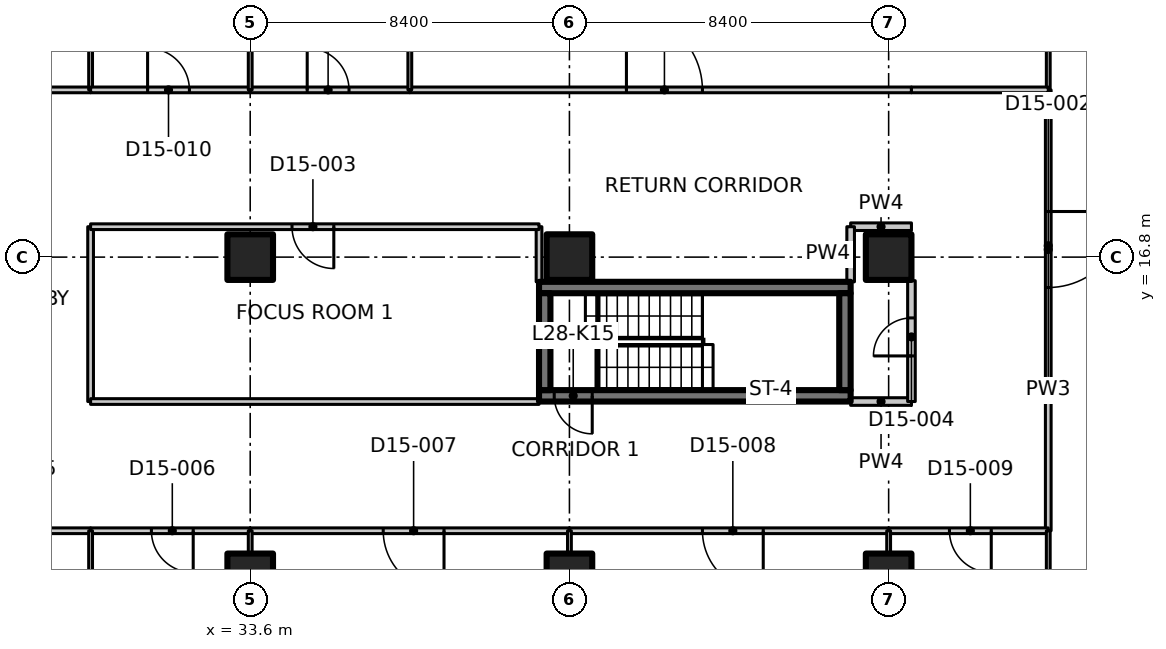
"""IFC4 building model, lengths in metres.
Left out: names, types, materials, properties, quantities, classifications, styles, units other than length and angle.
Written with IfcOpenShell. Run it as: python <this file> out.ifc"""

import sys

from ifc_helpers import new_model, si_unit, direction, frame, frame_2d, origin, origin_2d, place, context, subcontext, project, spatial, polyline, rectangle, outline, extrude, element, fill, save


model = new_model("IFC4")
c1 = context("Model", 3, precision=1e-05, world=origin(), true_north=direction((0.0, 1.0)))
c2 = subcontext(c1, "Body", "Model", "MODEL_VIEW")
j1 = project(units=[si_unit("LENGTHUNIT", "METRE"), si_unit("PLANEANGLEUNIT", "RADIAN")], contexts=[c1])
p1 = place(None, origin())
s1 = spatial("IfcSite", under=j1, at=p1, CompositionType="ELEMENT")
p2 = place(p1, origin())
s2 = spatial("IfcBuilding", under=s1, at=p2, CompositionType="ELEMENT")
p3 = place(p2, frame((0.0, 0.0, 116.9)))
s3 = spatial("IfcBuildingStorey", under=s2, at=p3, CompositionType="ELEMENT", Elevation=116.9)
for number, where, z_axis, x_axis in (
    (1, (33.6, 8.4, 0.0), (0.0, 0.0, 1.0), (1.0, 0.0, 0.0)),
    (2, (33.6, 16.8, 0.0), (0.0, 0.0, 1.0), (1.0, 0.0, 0.0)),
    (3, (42.0, 8.4, 0.0), (0.0, 0.0, 1.0), (1.0, 0.0, 0.0)),
    (4, (42.0, 16.8, 0.0), (0.0, 0.0, 1.0), (1.0, 0.0, 0.0)),
    (5, (50.4, 8.4, 0.0), (0.0, 0.0, 1.0), (1.0, 0.0, 0.0)),
    (6, (50.4, 16.8, 0.0), (0.0, 0.0, 1.0), (1.0, 0.0, 0.0)),
):
    element("IfcColumn", number, at=place(p3, frame(where, z_axis=z_axis, x_axis=x_axis)), inside=s3, PredefinedType="COLUMN", context=c2, shape_type="SweptSolid", body=[
        extrude(rectangle(XDim=1.2, YDim=1.2, at=origin_2d()), origin(), (0.0, 0.0, 1.0), 3.35),
    ])
p4 = place(p3, frame((49.4, 13.15, 0.0), z_axis=(0.0, 0.0, 1.0), x_axis=(-1.0, 0.0, 0.0)))
e7 = element("IfcWall", 7, at=p4, inside=s3, PredefinedType="SHEAR", context=c2, shape_type="SweptSolid", body=[
    extrude(rectangle(XDim=8.2, YDim=0.3, at=frame_2d((4.1, 0.0))), origin(), (0.0, 0.0, 1.0), 3.35),
])
p5 = place(p4, frame((6.8, 0.0, 0.0)))
e8 = element("IfcOpeningElement", 8, at=p5, cuts=e7, PredefinedType="OPENING", context=c2, shape_type="SweptSolid", body=[
    extrude(rectangle(XDim=1.0, YDim=2.1, at=frame_2d((0.5, 1.05))), frame((0.0, 0.16, 0.0), z_axis=(0.0, -1.0, 0.0), x_axis=(1.0, 0.0, 0.0)), (0.0, 0.0, 1.0), 0.32),
])
p6 = place(p3, frame((41.2, 16.0, 0.0), z_axis=(0.0, 0.0, 1.0), x_axis=(1.0, 0.0, 0.0)))
e9 = element("IfcWall", 9, at=p6, inside=s3, PredefinedType="SHEAR", context=c2, shape_type="SweptSolid", body=[
    extrude(rectangle(XDim=8.2, YDim=0.3, at=frame_2d((4.1, 0.0))), origin(), (0.0, 0.0, 1.0), 3.35),
])
for number, where, z_axis, x_axis in (
    (10, (41.35, 13.3, 0.0), (0.0, 0.0, 1.0), (0.0, 1.0, 0.0)),
    (11, (49.25, 13.3, 0.0), (0.0, 0.0, 1.0), (0.0, 1.0, 0.0)),
):
    element("IfcWall", number, at=place(p3, frame(where, z_axis=z_axis, x_axis=x_axis)), inside=s3, PredefinedType="SHEAR", context=c2, shape_type="SweptSolid", body=[
        extrude(rectangle(XDim=2.55, YDim=0.3, at=frame_2d((1.275, 0.0))), origin(), (0.0, 0.0, 1.0), 3.35),
    ])
p7 = place(p3, frame((25.2, 21.2, 0.0), z_axis=(0.0, 0.0, 1.0), x_axis=(1.0, 0.0, 0.0)))
e12 = element("IfcWall", 12, at=p7, inside=s3, PredefinedType="PARTITIONING", context=c2, shape_type="SweptSolid", body=[
    extrude(rectangle(XDim=4.2, YDim=0.15, at=frame_2d((2.1, 0.0))), origin(), (0.0, 0.0, 1.0), 3.33),
])
p8 = place(p3, frame((29.4, 17.6, 0.0), z_axis=(0.0, 0.0, 1.0), x_axis=(0.0, -1.0, 0.0)))
e13 = element("IfcWall", 13, at=p8, inside=s3, PredefinedType="PARTITIONING", context=c2, shape_type="SweptSolid", body=[
    extrude(rectangle(XDim=4.6, YDim=0.15, at=frame_2d((2.3, 0.0))), origin(), (0.0, 0.0, 1.0), 3.33),
])
p9 = place(p3, frame((29.4, 9.6, 0.0), z_axis=(0.0, 0.0, 1.0), x_axis=(-1.0, 0.0, 0.0)))
e14 = element("IfcWall", 14, at=p9, inside=s3, PredefinedType="PARTITIONING", context=c2, shape_type="SweptSolid", body=[
    extrude(rectangle(XDim=4.2, YDim=0.15, at=frame_2d((2.1, 0.0))), origin(), (0.0, 0.0, 1.0), 3.33),
])
p10 = place(p9, frame((1.5, 0.0, 0.0)))
e15 = element("IfcOpeningElement", 15, at=p10, cuts=e14, PredefinedType="OPENING", context=c2, shape_type="SweptSolid", body=[
    extrude(rectangle(XDim=1.1, YDim=2.1, at=frame_2d((0.55, 1.05))), frame((0.0, 0.085, 0.0), z_axis=(0.0, -1.0, 0.0), x_axis=(1.0, 0.0, 0.0)), (0.0, 0.0, 1.0), 0.17),
])
p11 = place(p3, frame((29.4, 27.429, 0.0), z_axis=(0.0, 0.0, 1.0), x_axis=(0.0, -1.0, 0.0)))
e16 = element("IfcWall", 16, at=p11, inside=s3, PredefinedType="PARTITIONING", context=c2, shape_type="SweptSolid", body=[
    extrude(outline(polyline([(0.0, 0.0), (6.229, 0.0), (6.229, 3.33), (2.679, 3.33), (2.677, 2.98), (1.781, 2.98), (1.779, 3.33), (0.154, 3.33), (0.0, 3.33), (0.0, 0.0)])), frame((0.0, 0.05, 0.0), z_axis=(0.0, -1.0, 0.0), x_axis=(1.0, 0.0, 0.0)), (0.0, 0.0, 1.0), 0.1),
])
p12 = place(p3, frame((54.6, 13.0, 0.0), z_axis=(0.0, 0.0, 1.0), x_axis=(0.0, -1.0, 0.0)))
e17 = element("IfcWall", 17, at=p12, inside=s3, PredefinedType="PARTITIONING", context=c2, shape_type="SweptSolid", body=[
    extrude(rectangle(XDim=3.4, YDim=0.15, at=frame_2d((1.7, 0.0))), origin(), (0.0, 0.0, 1.0), 3.33),
])
p13 = place(p3, frame((29.4, 13.0, 0.0), z_axis=(0.0, 0.0, 1.0), x_axis=(1.0, 0.0, 0.0)))
e18 = element("IfcWall", 18, at=p13, inside=s3, PredefinedType="PARTITIONING", context=c2, shape_type="SweptSolid", body=[
    extrude(rectangle(XDim=11.8, YDim=0.15, at=frame_2d((5.9, 0.0))), origin(), (0.0, 0.0, 1.0), 3.33),
])
p14 = place(p3, frame((49.4, 13.0, 0.0), z_axis=(0.0, 0.0, 1.0), x_axis=(1.0, 0.0, 0.0)))
e19 = element("IfcWall", 19, at=p14, inside=s3, PredefinedType="PARTITIONING", context=c2, shape_type="SweptSolid", body=[
    extrude(rectangle(XDim=1.6, YDim=0.2, at=frame_2d((0.8, 0.0))), origin(), (0.0, 0.0, 1.0), 3.33),
])
p15 = place(p3, frame((33.6, 9.6, 0.0), z_axis=(0.0, 0.0, 1.0), x_axis=(-1.0, 0.0, 0.0)))
e20 = element("IfcWall", 20, at=p15, inside=s3, PredefinedType="PARTITIONING", context=c2, shape_type="SweptSolid", body=[
    extrude(rectangle(XDim=4.2, YDim=0.15, at=frame_2d((2.1, 0.0))), origin(), (0.0, 0.0, 1.0), 3.33),
])
p16 = place(p15, frame((1.5, 0.0, 0.0)))
e21 = element("IfcOpeningElement", 21, at=p16, cuts=e20, PredefinedType="OPENING", context=c2, shape_type="SweptSolid", body=[
    extrude(rectangle(XDim=1.1, YDim=2.1, at=frame_2d((0.55, 1.05))), frame((0.0, 0.085, 0.0), z_axis=(0.0, -1.0, 0.0), x_axis=(1.0, 0.0, 0.0)), (0.0, 0.0, 1.0), 0.17),
])
p17 = place(p3, frame((42.0, 9.6, 0.0), z_axis=(0.0, 0.0, 1.0), x_axis=(-1.0, 0.0, 0.0)))
e22 = element("IfcWall", 22, at=p17, inside=s3, PredefinedType="PARTITIONING", context=c2, shape_type="SweptSolid", body=[
    extrude(rectangle(XDim=8.4, YDim=0.15, at=frame_2d((4.2, 0.0))), origin(), (0.0, 0.0, 1.0), 3.33),
])
p18 = place(p17, frame((3.3, 0.0, 0.0)))
e23 = element("IfcOpeningElement", 23, at=p18, cuts=e22, PredefinedType="OPENING", context=c2, shape_type="SweptSolid", body=[
    extrude(rectangle(XDim=1.6, YDim=2.1, at=frame_2d((0.8, 1.05))), frame((0.0, 0.085, 0.0), z_axis=(0.0, -1.0, 0.0), x_axis=(1.0, 0.0, 0.0)), (0.0, 0.0, 1.0), 0.17),
])
p19 = place(p3, frame((50.4, 9.6, 0.0), z_axis=(0.0, 0.0, 1.0), x_axis=(-1.0, 0.0, 0.0)))
e24 = element("IfcWall", 24, at=p19, inside=s3, PredefinedType="PARTITIONING", context=c2, shape_type="SweptSolid", body=[
    extrude(rectangle(XDim=8.4, YDim=0.15, at=frame_2d((4.2, 0.0))), origin(), (0.0, 0.0, 1.0), 3.33),
])
p20 = place(p19, frame((3.3, 0.0, 0.0)))
e25 = element("IfcOpeningElement", 25, at=p20, cuts=e24, PredefinedType="OPENING", context=c2, shape_type="SweptSolid", body=[
    extrude(rectangle(XDim=1.6, YDim=2.1, at=frame_2d((0.8, 1.05))), frame((0.0, 0.085, 0.0), z_axis=(0.0, -1.0, 0.0), x_axis=(1.0, 0.0, 0.0)), (0.0, 0.0, 1.0), 0.17),
])
p21 = place(p3, frame((54.6, 9.6, 0.0), z_axis=(0.0, 0.0, 1.0), x_axis=(-1.0, 0.0, 0.0)))
e26 = element("IfcWall", 26, at=p21, inside=s3, PredefinedType="PARTITIONING", context=c2, shape_type="SweptSolid", body=[
    extrude(rectangle(XDim=4.2, YDim=0.15, at=frame_2d((2.1, 0.0))), origin(), (0.0, 0.0, 1.0), 3.33),
])
p22 = place(p21, frame((1.5, 0.0, 0.0)))
e27 = element("IfcOpeningElement", 27, at=p22, cuts=e26, PredefinedType="OPENING", context=c2, shape_type="SweptSolid", body=[
    extrude(rectangle(XDim=1.1, YDim=2.1, at=frame_2d((0.55, 1.05))), frame((0.0, 0.085, 0.0), z_axis=(0.0, -1.0, 0.0), x_axis=(1.0, 0.0, 0.0)), (0.0, 0.0, 1.0), 0.17),
])
p23 = place(p3, frame((54.6, 21.2, 0.0), z_axis=(0.0, 0.0, 1.0), x_axis=(0.0, -1.0, 0.0)))
e28 = element("IfcWall", 28, at=p23, inside=s3, PredefinedType="PARTITIONING", context=c2, shape_type="SweptSolid", body=[
    extrude(rectangle(XDim=8.2, YDim=0.15, at=frame_2d((4.1, 0.0))), origin(), (0.0, 0.0, 1.0), 3.33),
])
p24 = place(p23, frame((3.2, 0.0, 0.0)))
e29 = element("IfcOpeningElement", 29, at=p24, cuts=e28, PredefinedType="OPENING", context=c2, shape_type="SweptSolid", body=[
    extrude(rectangle(XDim=2.0, YDim=2.4, at=frame_2d((1.0, 1.2))), frame((0.0, 0.085, 0.0), z_axis=(0.0, -1.0, 0.0), x_axis=(1.0, 0.0, 0.0)), (0.0, 0.0, 1.0), 0.17),
])
p25 = place(p3, frame((54.6, -1.365, 0.0), z_axis=(0.0, 0.0, 1.0), x_axis=(0.0, 1.0, 0.0)))
e30 = element("IfcWall", 30, at=p25, inside=s3, PredefinedType="PARTITIONING", context=c2, shape_type="SweptSolid", body=[
    extrude(outline(polyline([(0.0, 0.0), (10.965, 0.0), (10.965, 3.33), (1.815, 3.33), (1.813, 2.98), (0.917, 2.98), (0.915, 3.33), (0.265, 3.33), (0.0, 3.33), (0.0, 0.0)])), frame((0.0, 0.05, 0.0), z_axis=(0.0, -1.0, 0.0), x_axis=(1.0, 0.0, 0.0)), (0.0, 0.0, 1.0), 0.1),
])
p26 = place(p3, frame((54.6, 21.2, 0.0), z_axis=(0.0, 0.0, 1.0), x_axis=(0.0, 1.0, 0.0)))
e31 = element("IfcWall", 31, at=p26, inside=s3, PredefinedType="PARTITIONING", context=c2, shape_type="SweptSolid", body=[
    extrude(outline(polyline([(0.0, 0.0), (5.174, 0.0), (5.174, 3.33), (5.1, 3.33), (4.45, 3.33), (4.448, 2.98), (3.552, 2.98), (3.55, 3.33), (0.0, 3.33), (0.0, 0.0)])), frame((0.0, 0.05, 0.0), z_axis=(0.0, -1.0, 0.0), x_axis=(1.0, 0.0, 0.0)), (0.0, 0.0, 1.0), 0.1),
])
p27 = place(p3, frame((41.2, 16.15, 0.0), z_axis=(0.0, 0.0, 1.0), x_axis=(0.0, 1.0, 0.0)))
e32 = element("IfcWall", 32, at=p27, inside=s3, PredefinedType="PARTITIONING", context=c2, shape_type="SweptSolid", body=[
    extrude(rectangle(XDim=1.45, YDim=0.15, at=frame_2d((0.725, 0.0))), origin(), (0.0, 0.0, 1.0), 3.33),
])
p28 = place(p3, frame((41.2, 17.6, 0.0), z_axis=(0.0, 0.0, 1.0), x_axis=(-1.0, 0.0, 0.0)))
e33 = element("IfcWall", 33, at=p28, inside=s3, PredefinedType="PARTITIONING", context=c2, shape_type="SweptSolid", body=[
    extrude(rectangle(XDim=11.8, YDim=0.15, at=frame_2d((5.9, 0.0))), origin(), (0.0, 0.0, 1.0), 3.33),
])
p29 = place(p28, frame((5.4, 0.0, 0.0)))
e34 = element("IfcOpeningElement", 34, at=p29, cuts=e33, PredefinedType="OPENING", context=c2, shape_type="SweptSolid", body=[
    extrude(rectangle(XDim=1.1, YDim=2.1, at=frame_2d((0.55, 1.05))), frame((0.0, 0.085, 0.0), z_axis=(0.0, -1.0, 0.0), x_axis=(1.0, 0.0, 0.0)), (0.0, 0.0, 1.0), 0.17),
])
p30 = place(p3, frame((51.0, 17.6, 0.0), z_axis=(0.0, 0.0, 1.0), x_axis=(-1.0, 0.0, 0.0)))
e35 = element("IfcWall", 35, at=p30, inside=s3, PredefinedType="PARTITIONING", context=c2, shape_type="SweptSolid", body=[
    extrude(rectangle(XDim=1.6, YDim=0.2, at=frame_2d((0.8, 0.0))), origin(), (0.0, 0.0, 1.0), 3.33),
])
p31 = place(p3, frame((49.4, 17.6, 0.0), z_axis=(0.0, 0.0, 1.0), x_axis=(0.0, -1.0, 0.0)))
e36 = element("IfcWall", 36, at=p31, inside=s3, PredefinedType="PARTITIONING", context=c2, shape_type="SweptSolid", body=[
    extrude(rectangle(XDim=1.45, YDim=0.2, at=frame_2d((0.725, 0.0))), origin(), (0.0, 0.0, 1.0), 3.33),
])
p32 = place(p3, frame((29.4, 21.2, 0.0), z_axis=(0.0, 0.0, 1.0), x_axis=(1.0, 0.0, 0.0)))
e37 = element("IfcWall", 37, at=p32, inside=s3, PredefinedType="PARTITIONING", context=c2, shape_type="SweptSolid", body=[
    extrude(rectangle(XDim=4.2, YDim=0.15, at=frame_2d((2.1, 0.0))), origin(), (0.0, 0.0, 1.0), 3.33),
])
p33 = place(p32, frame((1.5, 0.0, 0.0)))
e38 = element("IfcOpeningElement", 38, at=p33, cuts=e37, PredefinedType="OPENING", context=c2, shape_type="SweptSolid", body=[
    extrude(rectangle(XDim=1.1, YDim=2.1, at=frame_2d((0.55, 1.05))), frame((0.0, 0.085, 0.0), z_axis=(0.0, -1.0, 0.0), x_axis=(1.0, 0.0, 0.0)), (0.0, 0.0, 1.0), 0.17),
])
p34 = place(p3, frame((33.6, 21.2, 0.0), z_axis=(0.0, 0.0, 1.0), x_axis=(1.0, 0.0, 0.0)))
e39 = element("IfcWall", 39, at=p34, inside=s3, PredefinedType="PARTITIONING", context=c2, shape_type="SweptSolid", body=[
    extrude(rectangle(XDim=4.2, YDim=0.15, at=frame_2d((2.1, 0.0))), origin(), (0.0, 0.0, 1.0), 3.33),
])
p35 = place(p34, frame((1.5, 0.0, 0.0)))
e40 = element("IfcOpeningElement", 40, at=p35, cuts=e39, PredefinedType="OPENING", context=c2, shape_type="SweptSolid", body=[
    extrude(rectangle(XDim=1.1, YDim=2.1, at=frame_2d((0.55, 1.05))), frame((0.0, 0.085, 0.0), z_axis=(0.0, -1.0, 0.0), x_axis=(1.0, 0.0, 0.0)), (0.0, 0.0, 1.0), 0.17),
])
p36 = place(p3, frame((37.8, 21.2, 0.0), z_axis=(0.0, 0.0, 1.0), x_axis=(1.0, 0.0, 0.0)))
e41 = element("IfcWall", 41, at=p36, inside=s3, PredefinedType="PARTITIONING", context=c2, shape_type="SweptSolid", body=[
    extrude(rectangle(XDim=13.2, YDim=0.15, at=frame_2d((6.6, 0.0))), origin(), (0.0, 0.0, 1.0), 3.33),
])
p37 = place(p36, frame((5.7, 0.0, 0.0)))
e42 = element("IfcOpeningElement", 42, at=p37, cuts=e41, PredefinedType="OPENING", context=c2, shape_type="SweptSolid", body=[
    extrude(rectangle(XDim=2.0, YDim=2.4, at=frame_2d((1.0, 1.2))), frame((0.0, 0.085, 0.0), z_axis=(0.0, -1.0, 0.0), x_axis=(1.0, 0.0, 0.0)), (0.0, 0.0, 1.0), 0.17),
])
p38 = place(p3, frame((51.0, 13.0, 0.0), z_axis=(0.0, 0.0, 1.0), x_axis=(0.0, 1.0, 0.0)))
e43 = element("IfcWall", 43, at=p38, inside=s3, PredefinedType="PARTITIONING", context=c2, shape_type="SweptSolid", body=[
    extrude(rectangle(XDim=3.18, YDim=0.2, at=frame_2d((1.59, 0.0))), origin(), (0.0, 0.0, 1.0), 3.33),
])
p39 = place(p38, frame((1.2, 0.0, 0.0)))
e44 = element("IfcOpeningElement", 44, at=p39, cuts=e43, PredefinedType="OPENING", context=c2, shape_type="SweptSolid", body=[
    extrude(rectangle(XDim=1.0, YDim=2.1, at=frame_2d((0.5, 1.05))), frame((0.0, 0.11, 0.0), z_axis=(0.0, -1.0, 0.0), x_axis=(1.0, 0.0, 0.0)), (0.0, 0.0, 1.0), 0.22),
])
p40 = place(p3, frame((51.0, 21.2, 0.0), z_axis=(0.0, 0.0, 1.0), x_axis=(1.0, 0.0, 0.0)))
e45 = element("IfcWall", 45, at=p40, inside=s3, PredefinedType="PARTITIONING", context=c2, shape_type="SweptSolid", body=[
    extrude(rectangle(XDim=3.6, YDim=0.15, at=frame_2d((1.8, 0.0))), origin(), (0.0, 0.0, 1.0), 3.33),
])
p41 = place(p3, frame((29.4, 9.6, 0.0), z_axis=(0.0, 0.0, 1.0), x_axis=(0.0, -1.0, 0.0)))
e46 = element("IfcWall", 46, at=p41, inside=s3, PredefinedType="PARTITIONING", context=c2, shape_type="SweptSolid", body=[
    extrude(outline(polyline([(0.0, 0.0), (10.965, 0.0), (10.965, 3.33), (10.7, 3.33), (10.05, 3.33), (10.048, 2.98), (9.152, 2.98), (9.15, 3.33), (0.0, 3.33), (0.0, 0.0)])), frame((0.0, 0.05, 0.0), z_axis=(0.0, -1.0, 0.0), x_axis=(1.0, 0.0, 0.0)), (0.0, 0.0, 1.0), 0.1),
])
for number, where, z_axis, x_axis in (
    (47, (33.6, 9.6, 0.0), (0.0, 0.0, 1.0), (0.0, -1.0, 0.0)),
    (48, (42.0, 9.6, 0.0), (0.0, 0.0, 1.0), (0.0, -1.0, 0.0)),
    (49, (50.4, 9.6, 0.0), (0.0, 0.0, 1.0), (0.0, -1.0, 0.0)),
):
    element("IfcWall", number, at=place(p3, frame(where, z_axis=z_axis, x_axis=x_axis)), inside=s3, PredefinedType="PARTITIONING", context=c2, shape_type="SweptSolid", body=[
        extrude(rectangle(XDim=0.58, YDim=0.1, at=frame_2d((0.29, 0.0))), origin(), (0.0, 0.0, 1.0), 3.33),
    ])
p42 = place(p3, frame((33.6, 24.68, 0.0), z_axis=(0.0, 0.0, 1.0), x_axis=(0.0, -1.0, 0.0)))
e50 = element("IfcWall", 50, at=p42, inside=s3, PredefinedType="PARTITIONING", context=c2, shape_type="SweptSolid", body=[
    extrude(rectangle(XDim=3.48, YDim=0.1, at=frame_2d((1.74, 0.0))), origin(), (0.0, 0.0, 1.0), 3.33),
])
p43 = place(p3, frame((37.8, 30.243, 0.0), z_axis=(0.0, 0.0, 1.0), x_axis=(0.0, -1.0, 0.0)))
e51 = element("IfcWall", 51, at=p43, inside=s3, PredefinedType="PARTITIONING", context=c2, shape_type="SweptSolid", body=[
    extrude(outline(polyline([(0.0, 0.0), (9.043, 0.0), (9.043, 3.33), (5.493, 3.33), (5.491, 2.98), (4.595, 2.98), (4.593, 3.33), (0.0, 3.33), (0.0, 0.0)])), frame((0.0, 0.05, 0.0), z_axis=(0.0, -1.0, 0.0), x_axis=(1.0, 0.0, 0.0)), (0.0, 0.0, 1.0), 0.1),
])
p44 = place(p5, origin())
e52 = element("IfcDoor", 52, at=p44, inside=s3, OperationType="SINGLE_SWING_LEFT", PredefinedType="DOOR", context=c2, shape_type="SweptSolid", body=[
    extrude(rectangle(XDim=1.0, YDim=2.1, at=frame_2d((0.5, 1.05))), frame((0.0, 0.025, 0.0), z_axis=(0.0, -1.0, 0.0), x_axis=(1.0, 0.0, 0.0)), (0.0, 0.0, 1.0), 0.05),
])
fill(e8, e52)
p45 = place(p24, origin())
e53 = element("IfcDoor", 53, at=p45, inside=s3, OperationType="DOUBLE_DOOR_SINGLE_SWING", PredefinedType="DOOR", context=c2, shape_type="SweptSolid", body=[
    extrude(rectangle(XDim=2.0, YDim=2.4, at=frame_2d((1.0, 1.2))), frame((0.0, 0.025, 0.0), z_axis=(0.0, -1.0, 0.0), x_axis=(1.0, 0.0, 0.0)), (0.0, 0.0, 1.0), 0.05),
])
fill(e29, e53)
p46 = place(p29, origin())
e54 = element("IfcDoor", 54, at=p46, inside=s3, OperationType="SINGLE_SWING_LEFT", PredefinedType="DOOR", context=c2, shape_type="SweptSolid", body=[
    extrude(rectangle(XDim=1.1, YDim=2.1, at=frame_2d((0.55, 1.05))), frame((0.0, 0.025, 0.0), z_axis=(0.0, -1.0, 0.0), x_axis=(1.0, 0.0, 0.0)), (0.0, 0.0, 1.0), 0.05),
])
fill(e34, e54)
p47 = place(p39, origin())
e55 = element("IfcDoor", 55, at=p47, inside=s3, OperationType="SINGLE_SWING_LEFT", PredefinedType="DOOR", context=c2, shape_type="SweptSolid", body=[
    extrude(rectangle(XDim=1.0, YDim=2.1, at=frame_2d((0.5, 1.05))), frame((0.0, 0.025, 0.0), z_axis=(0.0, -1.0, 0.0), x_axis=(1.0, 0.0, 0.0)), (0.0, 0.0, 1.0), 0.05),
])
fill(e44, e55)
p48 = place(p16, origin())
e56 = element("IfcDoor", 56, at=p48, inside=s3, OperationType="SINGLE_SWING_LEFT", PredefinedType="DOOR", context=c2, shape_type="SweptSolid", body=[
    extrude(rectangle(XDim=1.1, YDim=2.1, at=frame_2d((0.55, 1.05))), frame((0.0, 0.025, 0.0), z_axis=(0.0, -1.0, 0.0), x_axis=(1.0, 0.0, 0.0)), (0.0, 0.0, 1.0), 0.05),
])
fill(e21, e56)
p49 = place(p18, origin())
e57 = element("IfcDoor", 57, at=p49, inside=s3, OperationType="DOUBLE_DOOR_SINGLE_SWING", PredefinedType="DOOR", context=c2, shape_type="SweptSolid", body=[
    extrude(rectangle(XDim=1.6, YDim=2.1, at=frame_2d((0.8, 1.05))), frame((0.0, 0.025, 0.0), z_axis=(0.0, -1.0, 0.0), x_axis=(1.0, 0.0, 0.0)), (0.0, 0.0, 1.0), 0.05),
])
fill(e23, e57)
p50 = place(p20, origin())
e58 = element("IfcDoor", 58, at=p50, inside=s3, OperationType="DOUBLE_DOOR_SINGLE_SWING", PredefinedType="DOOR", context=c2, shape_type="SweptSolid", body=[
    extrude(rectangle(XDim=1.6, YDim=2.1, at=frame_2d((0.8, 1.05))), frame((0.0, 0.025, 0.0), z_axis=(0.0, -1.0, 0.0), x_axis=(1.0, 0.0, 0.0)), (0.0, 0.0, 1.0), 0.05),
])
fill(e25, e58)
p51 = place(p22, origin())
e59 = element("IfcDoor", 59, at=p51, inside=s3, OperationType="SINGLE_SWING_LEFT", PredefinedType="DOOR", context=c2, shape_type="SweptSolid", body=[
    extrude(rectangle(XDim=1.1, YDim=2.1, at=frame_2d((0.55, 1.05))), frame((0.0, 0.025, 0.0), z_axis=(0.0, -1.0, 0.0), x_axis=(1.0, 0.0, 0.0)), (0.0, 0.0, 1.0), 0.05),
])
fill(e27, e59)
p52 = place(p33, origin())
e60 = element("IfcDoor", 60, at=p52, inside=s3, OperationType="SINGLE_SWING_LEFT", PredefinedType="DOOR", context=c2, shape_type="SweptSolid", body=[
    extrude(rectangle(XDim=1.1, YDim=2.1, at=frame_2d((0.55, 1.05))), frame((0.0, 0.025, 0.0), z_axis=(0.0, -1.0, 0.0), x_axis=(1.0, 0.0, 0.0)), (0.0, 0.0, 1.0), 0.05),
])
fill(e38, e60)
p53 = place(p35, origin())
e61 = element("IfcDoor", 61, at=p53, inside=s3, OperationType="SINGLE_SWING_LEFT", PredefinedType="DOOR", context=c2, shape_type="SweptSolid", body=[
    extrude(rectangle(XDim=1.1, YDim=2.1, at=frame_2d((0.55, 1.05))), frame((0.0, 0.025, 0.0), z_axis=(0.0, -1.0, 0.0), x_axis=(1.0, 0.0, 0.0)), (0.0, 0.0, 1.0), 0.05),
])
fill(e40, e61)
p54 = place(p37, origin())
e62 = element("IfcDoor", 62, at=p54, inside=s3, OperationType="DOUBLE_DOOR_SINGLE_SWING", PredefinedType="DOOR", context=c2, shape_type="SweptSolid", body=[
    extrude(rectangle(XDim=2.0, YDim=2.4, at=frame_2d((1.0, 1.2))), frame((0.0, 0.025, 0.0), z_axis=(0.0, -1.0, 0.0), x_axis=(1.0, 0.0, 0.0)), (0.0, 0.0, 1.0), 0.05),
])
fill(e42, e62)
save(model, sys.argv[1])
